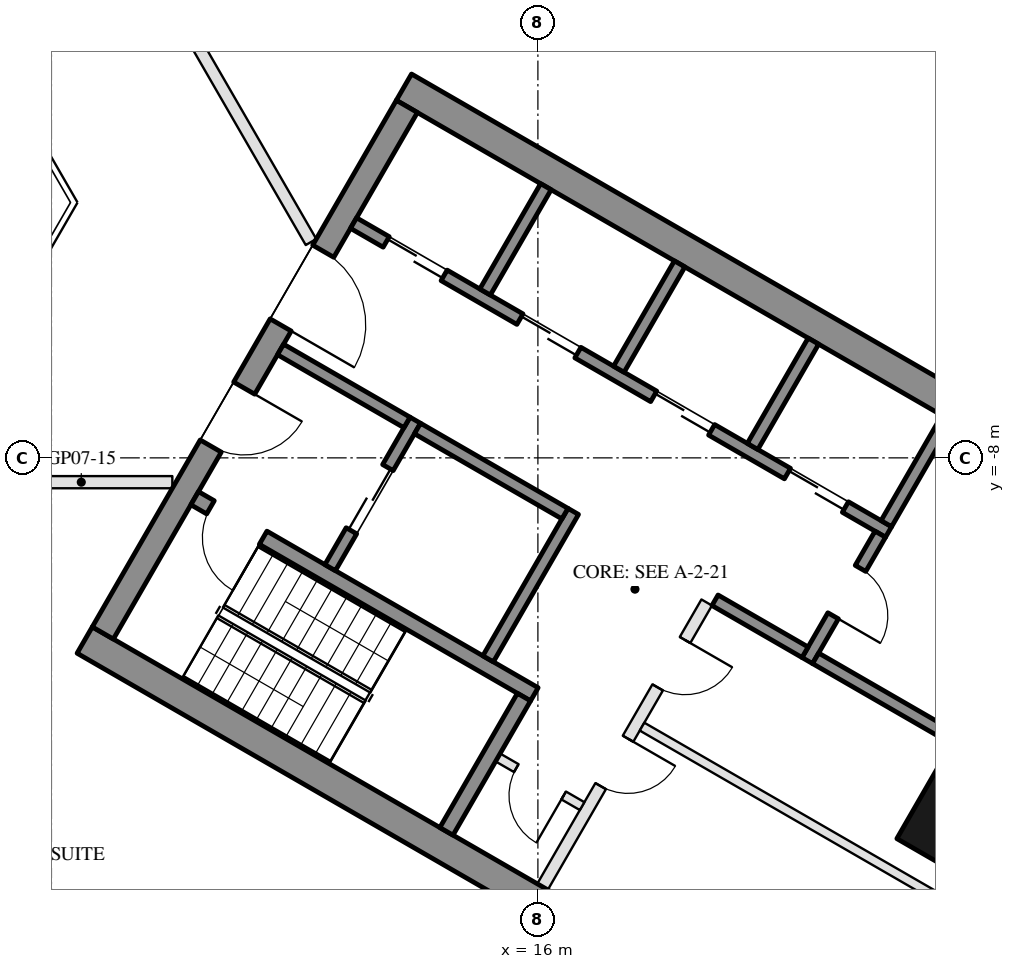
"""IFC4 building model, lengths in metres.
Left out: names, types, materials, properties, quantities, classifications, styles, units other than length and angle.
Written with IfcOpenShell. Run it as: python <this file> out.ifc"""

import sys

from ifc_helpers import new_model, si_unit, direction, frame, frame_2d, origin, origin_2d, place, context, subcontext, project, spatial, rectangle, hollow_rectangle, extrude, element, fill, save


model = new_model("IFC4")
c1 = context("Model", 3, precision=1e-05, world=origin(), true_north=direction((0.0, 1.0)))
c2 = subcontext(c1, "Body", "Model", "MODEL_VIEW")
j1 = project(units=[si_unit("LENGTHUNIT", "METRE"), si_unit("PLANEANGLEUNIT", "RADIAN")], contexts=[c1])
p1 = place(None, origin())
s1 = spatial("IfcSite", under=j1, at=p1, CompositionType="ELEMENT")
p2 = place(p1, origin())
s2 = spatial("IfcBuilding", under=s1, at=p2, CompositionType="ELEMENT")
p3 = place(p2, frame((0.0, 0.0, 98.3)))
s3 = spatial("IfcBuildingStorey", under=s2, at=p3, CompositionType="ELEMENT", Elevation=98.3)
p4 = place(p3, frame((23.643, -13.65, 0.0), z_axis=(0.0, 0.0, 1.0), x_axis=(0.5, 0.866025403784, 0.0)))
e1 = element("IfcColumn", 1, at=p4, inside=s3, PredefinedType="COLUMN", context=c2, shape_type="SweptSolid", body=[
    extrude(hollow_rectangle(XDim=2.8, YDim=2.4, WallThickness=0.07, at=origin_2d()), origin(), (0.0, 0.0, 1.0), 3.7),
])
p5 = place(p3, frame((26.257, -6.567, 0.0), z_axis=(0.0, 0.0, 1.0), x_axis=(-0.500023526245, 0.866011820475, 0.0)))
e2 = element("IfcWall", 2, at=p5, inside=s3, PredefinedType="SOLIDWALL", context=c2, shape_type="SweptSolid", body=[
    extrude(rectangle(XDim=11.816, YDim=0.35, at=frame_2d((5.908, 0.0))), origin(), (0.0, 0.0, 1.0), 3.55),
])
p6 = place(p5, frame((0.38, 0.0, 0.3)))
e3 = element("IfcOpeningElement", 3, at=p6, cuts=e2, PredefinedType="OPENING", context=c2, shape_type="SweptSolid", body=[
    extrude(rectangle(XDim=1.8, YDim=2.65, at=frame_2d((0.9, 1.325))), frame((0.0, 0.185, 0.0), z_axis=(0.0, -1.0, 0.0), x_axis=(1.0, 0.0, 0.0)), (0.0, 0.0, 1.0), 0.37),
])
p7 = place(p5, frame((7.716, 0.0, 0.0)))
e4 = element("IfcOpeningElement", 4, at=p7, cuts=e2, PredefinedType="OPENING", context=c2, shape_type="SweptSolid", body=[
    extrude(rectangle(XDim=2.4, YDim=2.4, at=frame_2d((1.2, 1.2))), frame((0.0, 0.185, 0.0), z_axis=(0.0, -1.0, 0.0), x_axis=(1.0, 0.0, 0.0)), (0.0, 0.0, 1.0), 0.37),
])
p8 = place(p5, frame((3.816, 0.0, 0.3)))
e5 = element("IfcOpeningElement", 5, at=p8, cuts=e2, PredefinedType="OPENING", context=c2, shape_type="SweptSolid", body=[
    extrude(rectangle(XDim=1.6, YDim=2.65, at=frame_2d((0.8, 1.325))), frame((0.0, 0.185, 0.0), z_axis=(0.0, -1.0, 0.0), x_axis=(1.0, 0.0, 0.0)), (0.0, 0.0, 1.0), 0.37),
])
p9 = place(p5, frame((5.716, 0.0, 0.3)))
e6 = element("IfcOpeningElement", 6, at=p9, cuts=e2, PredefinedType="OPENING", context=c2, shape_type="SweptSolid", body=[
    extrude(rectangle(XDim=1.6, YDim=2.65, at=frame_2d((0.8, 1.325))), frame((0.0, 0.185, 0.0), z_axis=(0.0, -1.0, 0.0), x_axis=(1.0, 0.0, 0.0)), (0.0, 0.0, 1.0), 0.37),
])
for number, where, z_axis, x_axis in (
    (7, (8.547, -10.997, 0.0), (0.0, 0.0, 1.0), (0.866, -0.5, 0.0)),
    (8, (13.797, -1.903, 0.0), (0.0, 0.0, 1.0), (0.866, -0.5, 0.0)),
):
    element("IfcWall", number, at=place(p3, frame(where, z_axis=z_axis, x_axis=x_axis)), inside=s3, PredefinedType="SHEAR", context=c2, shape_type="SweptSolid", body=[
        extrude(rectangle(XDim=14.837, YDim=0.5, at=frame_2d((7.418, 0.0))), origin(), (0.0, 0.0, 1.0), 3.5),
    ])
p10 = place(p3, frame((8.845, -10.88, 0.0), z_axis=(0.0, 0.0, 1.0), x_axis=(0.500004234368, 0.866022959057, 0.0)))
e9 = element("IfcWall", 9, at=p10, inside=s3, PredefinedType="SHEAR", context=c2, shape_type="SweptSolid", body=[
    extrude(rectangle(XDim=10.0, YDim=0.4, at=frame_2d((5.0, 0.0))), origin(), (0.0, 0.0, 1.0), 3.5),
])
p11 = place(p10, frame((3.55, 0.0, 0.0)))
e10 = element("IfcOpeningElement", 10, at=p11, cuts=e9, PredefinedType="OPENING", context=c2, shape_type="SweptSolid", body=[
    extrude(rectangle(XDim=1.1, YDim=2.1, at=frame_2d((0.55, 1.05))), frame((0.0, 0.21, 0.0), z_axis=(0.0, -1.0, 0.0), x_axis=(1.0, 0.0, 0.0)), (0.0, 0.0, 1.0), 0.42),
])
p12 = place(p10, frame((5.85, 0.0, 0.0)))
e11 = element("IfcOpeningElement", 11, at=p12, cuts=e9, PredefinedType="OPENING", context=c2, shape_type="SweptSolid", body=[
    extrude(rectangle(XDim=1.4, YDim=2.1, at=frame_2d((0.7, 1.05))), frame((0.0, 0.21, 0.0), z_axis=(0.0, -1.0, 0.0), x_axis=(1.0, 0.0, 0.0)), (0.0, 0.0, 1.0), 0.42),
])
p13 = place(p3, frame((10.356, -8.664, 0.0), z_axis=(0.0, 0.0, 1.0), x_axis=(0.866028629588, -0.499994412703, 0.0)))
e12 = element("IfcWall", 12, at=p13, inside=s3, PredefinedType="SHEAR", context=c2, shape_type="SweptSolid", body=[
    extrude(rectangle(XDim=6.45, YDim=0.25, at=frame_2d((3.225, 0.0))), origin(), (0.0, 0.0, 1.0), 3.5),
])
p14 = place(p13, frame((0.3, 0.0, 0.0)))
e13 = element("IfcOpeningElement", 13, at=p14, cuts=e12, PredefinedType="OPENING", context=c2, shape_type="SweptSolid", body=[
    extrude(rectangle(XDim=1.0, YDim=2.1, at=frame_2d((0.5, 1.05))), frame((0.0, 0.135, 0.0), z_axis=(0.0, -1.0, 0.0), x_axis=(1.0, 0.0, 0.0)), (0.0, 0.0, 1.0), 0.27),
])
p15 = place(p3, frame((14.496, -14.143, 0.0), z_axis=(0.0, 0.0, 1.0), x_axis=(0.500062241894, 0.865989465428, 0.0)))
e14 = element("IfcWall", 14, at=p15, inside=s3, PredefinedType="SHEAR", context=c2, shape_type="SweptSolid", body=[
    extrude(rectangle(XDim=2.55, YDim=0.25, at=frame_2d((1.275, 0.0))), origin(), (0.0, 0.0, 1.0), 3.5),
])
p16 = place(p3, frame((15.181, -11.305, 0.0), z_axis=(0.0, 0.0, 1.0), x_axis=(0.49994636267, 0.866056369097, 0.0)))
e15 = element("IfcWall", 15, at=p16, inside=s3, PredefinedType="SHEAR", context=c2, shape_type="SweptSolid", body=[
    extrude(rectangle(XDim=2.8, YDim=0.2, at=frame_2d((1.4, 0.0))), origin(), (0.0, 0.0, 1.0), 3.5),
])
p17 = place(p3, frame((12.583, -9.805, 0.0), z_axis=(0.0, 0.0, 1.0), x_axis=(0.49994636267, 0.866056369097, 0.0)))
e16 = element("IfcWall", 16, at=p17, inside=s3, PredefinedType="SHEAR", context=c2, shape_type="SweptSolid", body=[
    extrude(rectangle(XDim=2.8, YDim=0.2, at=frame_2d((1.4, 0.0))), origin(), (0.0, 0.0, 1.0), 3.5),
])
p18 = place(p17, frame((0.7, 0.0, 0.0)))
e17 = element("IfcOpeningElement", 17, at=p18, cuts=e16, PredefinedType="OPENING", context=c2, shape_type="SweptSolid", body=[
    extrude(rectangle(XDim=1.2, YDim=2.1, at=frame_2d((0.6, 1.05))), frame((0.0, 0.11, 0.0), z_axis=(0.0, -1.0, 0.0), x_axis=(1.0, 0.0, 0.0)), (0.0, 0.0, 1.0), 0.22),
])
p19 = place(p3, frame((11.768, -6.217, 0.0), z_axis=(0.0, 0.0, 1.0), x_axis=(0.866050077142, -0.499957262057, 0.0)))
e18 = element("IfcWall", 18, at=p19, inside=s3, PredefinedType="SHEAR", context=c2, shape_type="SweptSolid", body=[
    extrude(rectangle(XDim=2.4, YDim=0.2, at=frame_2d((1.2, 0.0))), origin(), (0.0, 0.0, 1.0), 3.5),
])
p20 = place(p3, frame((14.02, -7.517, 0.0), z_axis=(0.0, 0.0, 1.0), x_axis=(0.866034573852, -0.49998411664, 0.0)))
e19 = element("IfcWall", 19, at=p20, inside=s3, PredefinedType="SHEAR", context=c2, shape_type="SweptSolid", body=[
    extrude(rectangle(XDim=2.8, YDim=0.2, at=frame_2d((1.4, 0.0))), origin(), (0.0, 0.0, 1.0), 3.5),
])
p21 = place(p3, frame((12.968, -4.138, 0.0), z_axis=(0.0, 0.0, 1.0), x_axis=(0.866028328073, -0.49999493495, 0.0)))
e20 = element("IfcWall", 20, at=p21, inside=s3, PredefinedType="SHEAR", context=c2, shape_type="SweptSolid", body=[
    extrude(rectangle(XDim=10.16, YDim=0.2, at=frame_2d((5.08, 0.0))), origin(), (0.0, 0.0, 1.0), 3.5),
])
p22 = place(p21, frame((0.62, 0.0, 0.0)))
e21 = element("IfcOpeningElement", 21, at=p22, cuts=e20, PredefinedType="OPENING", context=c2, shape_type="SweptSolid", body=[
    extrude(rectangle(XDim=1.1, YDim=2.1, at=frame_2d((0.55, 1.05))), frame((0.0, 0.11, 0.0), z_axis=(0.0, -1.0, 0.0), x_axis=(1.0, 0.0, 0.0)), (0.0, 0.0, 1.0), 0.22),
])
p23 = place(p21, frame((3.16, 0.0, 0.0)))
e22 = element("IfcOpeningElement", 22, at=p23, cuts=e20, PredefinedType="OPENING", context=c2, shape_type="SweptSolid", body=[
    extrude(rectangle(XDim=1.1, YDim=2.1, at=frame_2d((0.55, 1.05))), frame((0.0, 0.11, 0.0), z_axis=(0.0, -1.0, 0.0), x_axis=(1.0, 0.0, 0.0)), (0.0, 0.0, 1.0), 0.22),
])
p24 = place(p21, frame((5.7, 0.0, 0.0)))
e23 = element("IfcOpeningElement", 23, at=p24, cuts=e20, PredefinedType="OPENING", context=c2, shape_type="SweptSolid", body=[
    extrude(rectangle(XDim=1.1, YDim=2.1, at=frame_2d((0.55, 1.05))), frame((0.0, 0.11, 0.0), z_axis=(0.0, -1.0, 0.0), x_axis=(1.0, 0.0, 0.0)), (0.0, 0.0, 1.0), 0.22),
])
p25 = place(p21, frame((8.24, 0.0, 0.0)))
e24 = element("IfcOpeningElement", 24, at=p25, cuts=e20, PredefinedType="OPENING", context=c2, shape_type="SweptSolid", body=[
    extrude(rectangle(XDim=1.1, YDim=2.1, at=frame_2d((0.55, 1.05))), frame((0.0, 0.11, 0.0), z_axis=(0.0, -1.0, 0.0), x_axis=(1.0, 0.0, 0.0)), (0.0, 0.0, 1.0), 0.22),
])
p26 = place(p3, frame((20.43, -11.333, 0.0), z_axis=(0.0, 0.0, 1.0), x_axis=(0.500001309137, 0.866024647952, 0.0)))
e25 = element("IfcWall", 25, at=p26, inside=s3, PredefinedType="SHEAR", context=c2, shape_type="SweptSolid", body=[
    extrude(rectangle(XDim=2.4, YDim=0.2, at=frame_2d((1.2, 0.0))), origin(), (0.0, 0.0, 1.0), 3.5),
])
p27 = place(p26, frame((0.85, 0.0, 0.0)))
e26 = element("IfcOpeningElement", 26, at=p27, cuts=e25, PredefinedType="OPENING", context=c2, shape_type="SweptSolid", body=[
    extrude(rectangle(XDim=0.9, YDim=2.1, at=frame_2d((0.45, 1.05))), frame((0.0, 0.11, 0.0), z_axis=(0.0, -1.0, 0.0), x_axis=(1.0, 0.0, 0.0)), (0.0, 0.0, 1.0), 0.22),
])
p28 = place(p3, frame((18.913, -10.342, 0.0), z_axis=(0.0, 0.0, 1.0), x_axis=(0.866038183914, -0.499977863513, 0.0)))
e27 = element("IfcWall", 27, at=p28, inside=s3, PredefinedType="SHEAR", context=c2, shape_type="SweptSolid", body=[
    extrude(rectangle(XDim=1.71, YDim=0.2, at=frame_2d((0.855, 0.0))), origin(), (0.0, 0.0, 1.0), 3.5),
])
for number, where, z_axis, x_axis in (
    (28, (15.131, -5.272, 0.0), (0.0, 0.0, 1.0), (0.5, 0.866, 0.0)),
    (29, (17.331, -6.542, 0.0), (0.0, 0.0, 1.0), (0.5, 0.866, 0.0)),
    (30, (19.531, -7.812, 0.0), (0.0, 0.0, 1.0), (0.5, 0.866, 0.0)),
    (31, (21.73, -9.082, 0.0), (0.0, 0.0, 1.0), (0.5, 0.866, 0.0)),
):
    element("IfcWall", number, at=place(p3, frame(where, z_axis=z_axis, x_axis=x_axis)), inside=s3, PredefinedType="SHEAR", context=c2, shape_type="SweptSolid", body=[
        extrude(rectangle(XDim=2.0, YDim=0.2, at=frame_2d((1.0, 0.0))), origin(), (0.0, 0.0, 1.0), 3.5),
    ])
p29 = place(p3, frame((20.567, -11.297, 0.0), z_axis=(0.0, 0.0, 1.0), x_axis=(0.866060851709, -0.499938597367, 0.0)))
e32 = element("IfcWall", 32, at=p29, inside=s3, PredefinedType="SHEAR", context=c2, shape_type="SweptSolid", body=[
    extrude(rectangle(XDim=2.64, YDim=0.2, at=frame_2d((1.32, 0.0))), origin(), (0.0, 0.0, 1.0), 3.5),
])
p30 = place(p3, frame((16.076, -15.055, 0.0), z_axis=(0.0, 0.0, 1.0), x_axis=(0.499995103361, 0.866028230842, 0.0)))
e33 = element("IfcWall", 33, at=p30, inside=s3, PredefinedType="PARTITIONING", context=c2, shape_type="SweptSolid", body=[
    extrude(rectangle(XDim=5.4, YDim=0.2, at=frame_2d((2.7, 0.0))), origin(), (0.0, 0.0, 1.0), 3.5),
])
p31 = place(p30, frame((1.913, 0.0, 0.0)))
e34 = element("IfcOpeningElement", 34, at=p31, cuts=e33, PredefinedType="OPENING", context=c2, shape_type="SweptSolid", body=[
    extrude(rectangle(XDim=0.9, YDim=2.1, at=frame_2d((0.45, 1.05))), frame((0.0, 0.11, 0.0), z_axis=(0.0, -1.0, 0.0), x_axis=(1.0, 0.0, 0.0)), (0.0, 0.0, 1.0), 0.22),
])
p32 = place(p30, frame((3.788, 0.0, 0.0)))
e35 = element("IfcOpeningElement", 35, at=p32, cuts=e33, PredefinedType="OPENING", context=c2, shape_type="SweptSolid", body=[
    extrude(rectangle(XDim=0.9, YDim=2.1, at=frame_2d((0.45, 1.05))), frame((0.0, 0.11, 0.0), z_axis=(0.0, -1.0, 0.0), x_axis=(1.0, 0.0, 0.0)), (0.0, 0.0, 1.0), 0.22),
])
p33 = place(p3, frame((15.342, -12.928, 0.0), z_axis=(0.0, 0.0, 1.0), x_axis=(0.865989903783, -0.500061482766, 0.0)))
e36 = element("IfcWall", 36, at=p33, inside=s3, PredefinedType="PARTITIONING", context=c2, shape_type="SweptSolid", body=[
    extrude(rectangle(XDim=1.6, YDim=0.15, at=frame_2d((0.8, 0.0))), origin(), (0.0, 0.0, 1.0), 3.5),
])
p34 = place(p33, frame((0.35, 0.0, 0.0)))
e37 = element("IfcOpeningElement", 37, at=p34, cuts=e36, PredefinedType="OPENING", context=c2, shape_type="SweptSolid", body=[
    extrude(rectangle(XDim=0.9, YDim=2.1, at=frame_2d((0.45, 1.05))), frame((0.0, 0.085, 0.0), z_axis=(0.0, -1.0, 0.0), x_axis=(1.0, 0.0, 0.0)), (0.0, 0.0, 1.0), 0.17),
])
p35 = place(p3, frame((17.713, -12.42, 0.0), z_axis=(0.0, 0.0, 1.0), x_axis=(0.866016523273, -0.500015381182, 0.0)))
e38 = element("IfcWall", 38, at=p35, inside=s3, PredefinedType="PARTITIONING", context=c2, shape_type="SweptSolid", body=[
    extrude(rectangle(XDim=6.95, YDim=0.15, at=frame_2d((3.475, 0.0))), origin(), (0.0, 0.0, 1.0), 3.5),
])
p36 = place(p3, frame((9.988, -8.4, 0.0), z_axis=(0.0, 0.0, 1.0), x_axis=(-1.0, 0.0, 0.0)))
e39 = element("IfcWall", 39, at=p36, inside=s3, PredefinedType="PARTITIONING", context=c2, shape_type="SweptSolid", body=[
    extrude(rectangle(XDim=7.488, YDim=0.2, at=frame_2d((3.744, 0.0))), origin(), (0.0, 0.0, 1.0), 2.95),
])
p37 = place(p36, frame((3.244, 0.0, 0.0)))
e40 = element("IfcOpeningElement", 40, at=p37, cuts=e39, PredefinedType="OPENING", context=c2, shape_type="SweptSolid", body=[
    extrude(rectangle(XDim=1.0, YDim=2.1, at=frame_2d((0.5, 1.05))), frame((0.0, 0.11, 0.0), z_axis=(0.0, -1.0, 0.0), x_axis=(1.0, 0.0, 0.0)), (0.0, 0.0, 1.0), 0.22),
])
p38 = place(p3, frame((6.325, 5.845, 0.0), z_axis=(0.0, 0.0, 1.0), x_axis=(0.500002143212, -0.866024166397, 0.0)))
e41 = element("IfcWall", 41, at=p38, inside=s3, PredefinedType="PARTITIONING", context=c2, shape_type="SweptSolid", body=[
    extrude(rectangle(XDim=11.888, YDim=0.2, at=frame_2d((5.944, 0.0))), origin(), (0.0, 0.0, 1.0), 2.95),
])
p39 = place(p38, frame((5.444, 0.0, 0.0)))
e42 = element("IfcOpeningElement", 42, at=p39, cuts=e41, PredefinedType="OPENING", context=c2, shape_type="SweptSolid", body=[
    extrude(rectangle(XDim=1.0, YDim=2.1, at=frame_2d((0.5, 1.05))), frame((0.0, 0.11, 0.0), z_axis=(0.0, -1.0, 0.0), x_axis=(1.0, 0.0, 0.0)), (0.0, 0.0, 1.0), 0.22),
])
p40 = place(p18, origin())
e43 = element("IfcDoor", 43, at=p40, inside=s3, OperationType="DOUBLE_DOOR_SLIDING", PredefinedType="DOOR", context=c2, shape_type="SweptSolid", body=[
    extrude(rectangle(XDim=1.2, YDim=2.1, at=frame_2d((0.6, 1.05))), frame((0.0, 0.025, 0.0), z_axis=(0.0, -1.0, 0.0), x_axis=(1.0, 0.0, 0.0)), (0.0, 0.0, 1.0), 0.05),
])
fill(e17, e43)
p41 = place(p34, frame((0.9, 0.0, 0.0), z_axis=(0.0, 0.0, 1.0), x_axis=(-1.0, 0.0, 0.0)))
e44 = element("IfcDoor", 44, at=p41, inside=s3, OperationType="SINGLE_SWING_LEFT", PredefinedType="DOOR", context=c2, shape_type="SweptSolid", body=[
    extrude(rectangle(XDim=0.9, YDim=2.1, at=frame_2d((0.45, 1.05))), frame((0.0, 0.025, 0.0), z_axis=(0.0, -1.0, 0.0), x_axis=(1.0, 0.0, 0.0)), (0.0, 0.0, 1.0), 0.05),
])
fill(e37, e44)
p42 = place(p22, origin())
e45 = element("IfcDoor", 45, at=p42, inside=s3, OperationType="DOUBLE_DOOR_SLIDING", PredefinedType="DOOR", context=c2, shape_type="SweptSolid", body=[
    extrude(rectangle(XDim=1.1, YDim=2.1, at=frame_2d((0.55, 1.05))), frame((0.0, 0.025, 0.0), z_axis=(0.0, -1.0, 0.0), x_axis=(1.0, 0.0, 0.0)), (0.0, 0.0, 1.0), 0.05),
])
fill(e21, e45)
p43 = place(p23, origin())
e46 = element("IfcDoor", 46, at=p43, inside=s3, OperationType="DOUBLE_DOOR_SLIDING", PredefinedType="DOOR", context=c2, shape_type="SweptSolid", body=[
    extrude(rectangle(XDim=1.1, YDim=2.1, at=frame_2d((0.55, 1.05))), frame((0.0, 0.025, 0.0), z_axis=(0.0, -1.0, 0.0), x_axis=(1.0, 0.0, 0.0)), (0.0, 0.0, 1.0), 0.05),
])
fill(e22, e46)
p44 = place(p24, origin())
e47 = element("IfcDoor", 47, at=p44, inside=s3, OperationType="DOUBLE_DOOR_SLIDING", PredefinedType="DOOR", context=c2, shape_type="SweptSolid", body=[
    extrude(rectangle(XDim=1.1, YDim=2.1, at=frame_2d((0.55, 1.05))), frame((0.0, 0.025, 0.0), z_axis=(0.0, -1.0, 0.0), x_axis=(1.0, 0.0, 0.0)), (0.0, 0.0, 1.0), 0.05),
])
fill(e23, e47)
p45 = place(p25, origin())
e48 = element("IfcDoor", 48, at=p45, inside=s3, OperationType="DOUBLE_DOOR_SLIDING", PredefinedType="DOOR", context=c2, shape_type="SweptSolid", body=[
    extrude(rectangle(XDim=1.1, YDim=2.1, at=frame_2d((0.55, 1.05))), frame((0.0, 0.025, 0.0), z_axis=(0.0, -1.0, 0.0), x_axis=(1.0, 0.0, 0.0)), (0.0, 0.0, 1.0), 0.05),
])
fill(e24, e48)
p46 = place(p27, frame((0.9, 0.0, 0.0), z_axis=(0.0, 0.0, 1.0), x_axis=(-1.0, 0.0, 0.0)))
e49 = element("IfcDoor", 49, at=p46, inside=s3, OperationType="SINGLE_SWING_RIGHT", PredefinedType="DOOR", context=c2, shape_type="SweptSolid", body=[
    extrude(rectangle(XDim=0.9, YDim=2.1, at=frame_2d((0.45, 1.05))), frame((0.0, 0.025, 0.0), z_axis=(0.0, -1.0, 0.0), x_axis=(1.0, 0.0, 0.0)), (0.0, 0.0, 1.0), 0.05),
])
fill(e26, e49)
p47 = place(p31, frame((0.9, 0.0, 0.0), z_axis=(0.0, 0.0, 1.0), x_axis=(-1.0, 0.0, 0.0)))
e50 = element("IfcDoor", 50, at=p47, inside=s3, OperationType="SINGLE_SWING_LEFT", PredefinedType="DOOR", context=c2, shape_type="SweptSolid", body=[
    extrude(rectangle(XDim=0.9, YDim=2.1, at=frame_2d((0.45, 1.05))), frame((0.0, 0.025, 0.0), z_axis=(0.0, -1.0, 0.0), x_axis=(1.0, 0.0, 0.0)), (0.0, 0.0, 1.0), 0.05),
])
fill(e34, e50)
p48 = place(p32, frame((0.9, 0.0, 0.0), z_axis=(0.0, 0.0, 1.0), x_axis=(-1.0, 0.0, 0.0)))
e51 = element("IfcDoor", 51, at=p48, inside=s3, OperationType="SINGLE_SWING_LEFT", PredefinedType="DOOR", context=c2, shape_type="SweptSolid", body=[
    extrude(rectangle(XDim=0.9, YDim=2.1, at=frame_2d((0.45, 1.05))), frame((0.0, 0.025, 0.0), z_axis=(0.0, -1.0, 0.0), x_axis=(1.0, 0.0, 0.0)), (0.0, 0.0, 1.0), 0.05),
])
fill(e35, e51)
p49 = place(p11, frame((1.1, 0.0, 0.0), z_axis=(0.0, 0.0, 1.0), x_axis=(-1.0, 0.0, 0.0)))
e52 = element("IfcDoor", 52, at=p49, inside=s3, OperationType="SINGLE_SWING_LEFT", PredefinedType="DOOR", context=c2, shape_type="SweptSolid", body=[
    extrude(rectangle(XDim=1.1, YDim=2.1, at=frame_2d((0.55, 1.05))), frame((0.0, 0.025, 0.0), z_axis=(0.0, -1.0, 0.0), x_axis=(1.0, 0.0, 0.0)), (0.0, 0.0, 1.0), 0.05),
])
fill(e10, e52)
p50 = place(p12, frame((1.4, 0.0, 0.0), z_axis=(0.0, 0.0, 1.0), x_axis=(-1.0, 0.0, 0.0)))
e53 = element("IfcDoor", 53, at=p50, inside=s3, OperationType="DOUBLE_DOOR_SINGLE_SWING", PredefinedType="DOOR", context=c2, shape_type="SweptSolid", body=[
    extrude(rectangle(XDim=1.4, YDim=2.1, at=frame_2d((0.7, 1.05))), frame((0.0, 0.025, 0.0), z_axis=(0.0, -1.0, 0.0), x_axis=(1.0, 0.0, 0.0)), (0.0, 0.0, 1.0), 0.05),
])
fill(e11, e53)
p51 = place(p14, frame((1.0, 0.0, 0.0), z_axis=(0.0, 0.0, 1.0), x_axis=(-1.0, 0.0, 0.0)))
e54 = element("IfcDoor", 54, at=p51, inside=s3, OperationType="SINGLE_SWING_LEFT", PredefinedType="DOOR", context=c2, shape_type="SweptSolid", body=[
    extrude(rectangle(XDim=1.0, YDim=2.1, at=frame_2d((0.5, 1.05))), frame((0.0, 0.025, 0.0), z_axis=(0.0, -1.0, 0.0), x_axis=(1.0, 0.0, 0.0)), (0.0, 0.0, 1.0), 0.05),
])
fill(e13, e54)
save(model, sys.argv[1])
